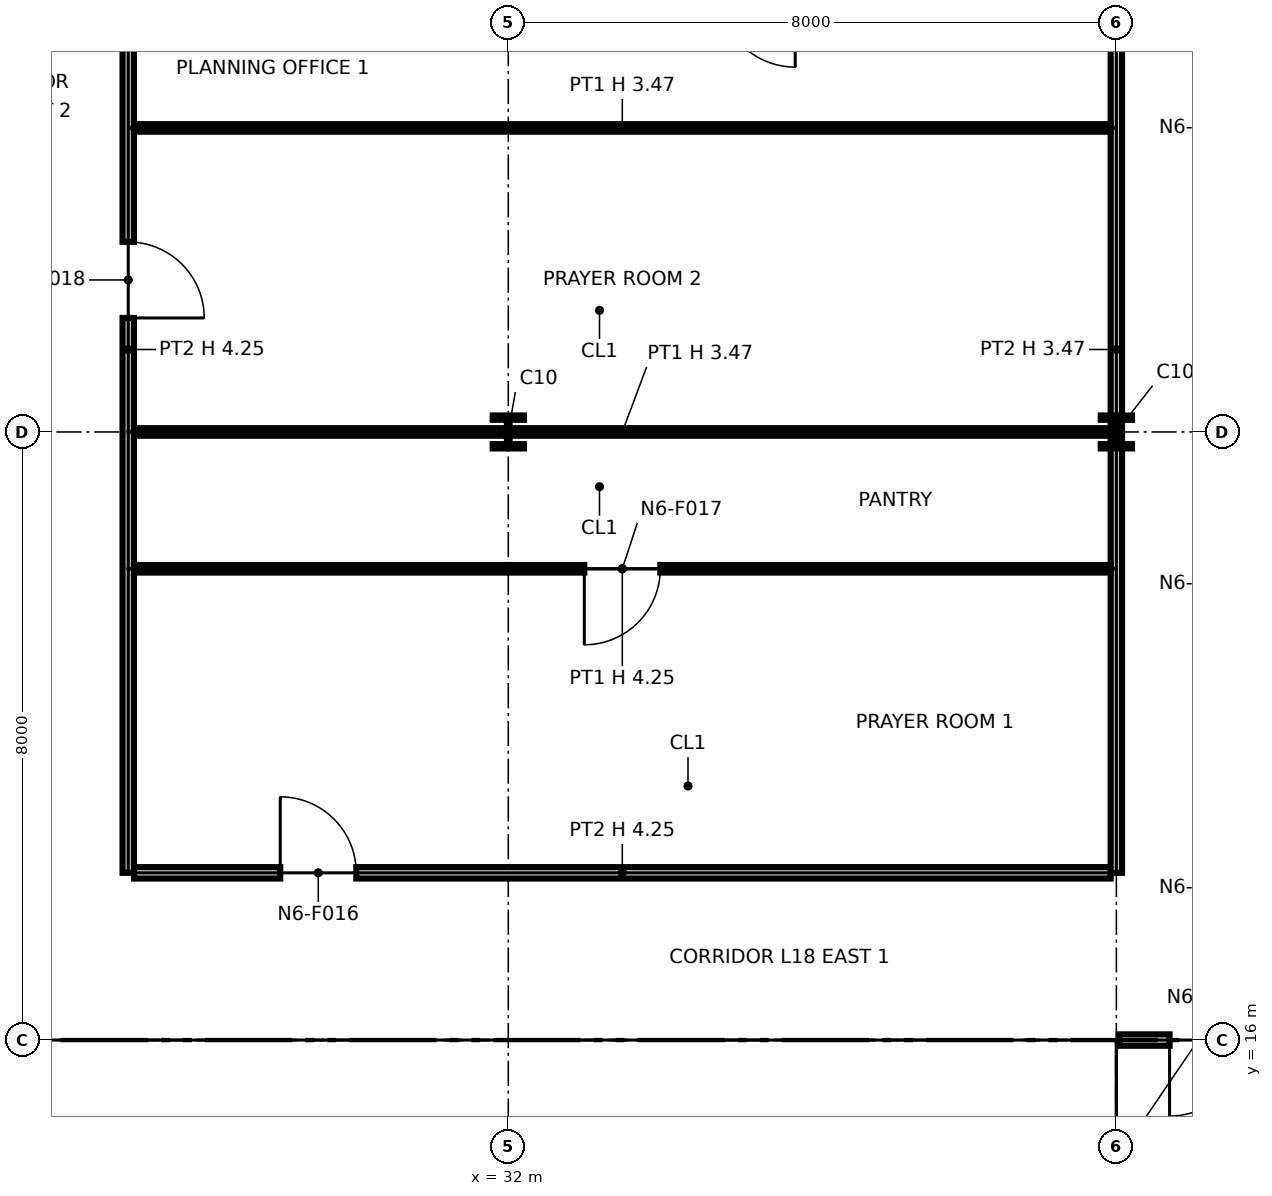
"""IFC4 building model, lengths in metres.
Left out: names, types, materials, properties, quantities, classifications, styles, units other than length and angle.
Written with IfcOpenShell. Run it as: python <this file> out.ifc"""

import sys

from ifc_helpers import new_model, si_unit, direction, frame, frame_2d, origin, origin_2d, place, context, subcontext, project, spatial, polyline, rectangle, i_section, outline, extrude, element, fill, save


model = new_model("IFC4")
c1 = context("Model", 3, precision=1e-05, world=origin(), true_north=direction((0.0, 1.0)))
c2 = subcontext(c1, "Body", "Model", "MODEL_VIEW")
j1 = project(units=[si_unit("LENGTHUNIT", "METRE"), si_unit("PLANEANGLEUNIT", "RADIAN")], contexts=[c1])
p1 = place(None, origin())
s1 = spatial("IfcSite", under=j1, at=p1, CompositionType="ELEMENT")
p2 = place(p1, origin())
s2 = spatial("IfcBuilding", under=s1, at=p2, CompositionType="ELEMENT")
p3 = place(p2, frame((0.0, 0.0, 96.4)))
s3 = spatial("IfcBuildingStorey", under=s2, at=p3, CompositionType="ELEMENT", Elevation=96.4)
p4 = place(p3, frame((32.0, 16.0, 0.0), z_axis=(0.0, 0.0, 1.0), x_axis=(1.0, 0.0, 0.0)))
e1 = element("IfcColumn", 1, at=p4, inside=s3, PredefinedType="COLUMN", context=c2, shape_type="SweptSolid", body=[
    extrude(i_section(OverallWidth=0.406, OverallDepth=0.417, WebThickness=0.03, FlangeThickness=0.048, at=origin_2d()), origin(), (0.0, 0.0, 1.0), 4.25),
])
p5 = place(p3, frame((32.0, 24.0, 0.0), z_axis=(0.0, 0.0, 1.0), x_axis=(1.0, 0.0, 0.0)))
e2 = element("IfcColumn", 2, at=p5, inside=s3, PredefinedType="COLUMN", context=c2, shape_type="SweptSolid", body=[
    extrude(i_section(OverallWidth=0.411, OverallDepth=0.434, WebThickness=0.036, FlangeThickness=0.057, at=origin_2d()), origin(), (0.0, 0.0, 1.0), 4.25),
])
p6 = place(p3, frame((40.0, 16.0, 0.0), z_axis=(0.0, 0.0, 1.0), x_axis=(1.0, 0.0, 0.0)))
e3 = element("IfcColumn", 3, at=p6, inside=s3, PredefinedType="COLUMN", context=c2, shape_type="SweptSolid", body=[
    extrude(i_section(OverallWidth=0.406, OverallDepth=0.417, WebThickness=0.03, FlangeThickness=0.048, at=origin_2d()), origin(), (0.0, 0.0, 1.0), 4.25),
])
p7 = place(p3, frame((40.0, 24.0, 0.0), z_axis=(0.0, 0.0, 1.0), x_axis=(1.0, 0.0, 0.0)))
e4 = element("IfcColumn", 4, at=p7, inside=s3, PredefinedType="COLUMN", context=c2, shape_type="SweptSolid", body=[
    extrude(i_section(OverallWidth=0.411, OverallDepth=0.434, WebThickness=0.036, FlangeThickness=0.057, at=origin_2d()), origin(), (0.0, 0.0, 1.0), 4.25),
])
p8 = place(p3, frame((24.65, 15.25, 0.0), z_axis=(0.0, 0.0, 1.0), x_axis=(1.0, 0.0, 0.0)))
e5 = element("IfcWall", 5, at=p8, inside=s3, PredefinedType="PARTITIONING", context=c2, shape_type="SweptSolid", body=[
    extrude(outline(polyline([(0.0, 0.0), (14.7, 0.0), (14.7, 4.25), (7.469, 4.25), (7.469, 3.632), (7.231, 3.632), (7.23, 4.25), (0.0, 4.25), (0.0, 0.0)])), frame((0.0, 0.1, 0.0), z_axis=(0.0, -1.0, 0.0), x_axis=(1.0, 0.0, 0.0)), (0.0, 0.0, 1.0), 0.2),
])
p9 = place(p8, frame((2.85, 0.0, 0.0)))
e6 = element("IfcOpeningElement", 6, at=p9, cuts=e5, PredefinedType="OPENING", context=c2, shape_type="SweptSolid", body=[
    extrude(rectangle(XDim=1.8, YDim=2.1, at=frame_2d((0.9, 1.05))), frame((0.0, 0.11, 0.0), z_axis=(0.0, -1.0, 0.0), x_axis=(1.0, 0.0, 0.0)), (0.0, 0.0, 1.0), 0.22),
])
p10 = place(p8, frame((9.95, 0.0, 0.0), z_axis=(0.0, 0.0, 1.0), x_axis=(-1.0, 0.0, 0.0)))
e7 = element("IfcOpeningElement", 7, at=p10, cuts=e5, PredefinedType="OPENING", context=c2, shape_type="SweptSolid", body=[
    extrude(rectangle(XDim=1.4, YDim=2.1, at=frame_2d((0.7, 1.05))), frame((0.0, 0.11, 0.0), z_axis=(0.0, -1.0, 0.0), x_axis=(1.0, 0.0, 0.0)), (0.0, 0.0, 1.0), 0.22),
])
p11 = place(p8, frame((13.4, 0.0, 0.0), z_axis=(0.0, 0.0, 1.0), x_axis=(-1.0, 0.0, 0.0)))
e8 = element("IfcOpeningElement", 8, at=p11, cuts=e5, PredefinedType="OPENING", context=c2, shape_type="SweptSolid", body=[
    extrude(rectangle(XDim=1.4, YDim=2.1, at=frame_2d((0.7, 1.05))), frame((0.0, 0.11, 0.0), z_axis=(0.0, -1.0, 0.0), x_axis=(1.0, 0.0, 0.0)), (0.0, 0.0, 1.0), 0.22),
])
p12 = place(p3, frame((32.0, 13.2, 0.0), z_axis=(0.0, 0.0, 1.0), x_axis=(0.0, 1.0, 0.0)))
e9 = element("IfcWall", 9, at=p12, inside=s3, PredefinedType="PARTITIONING", context=c2, shape_type="SweptSolid", body=[
    extrude(rectangle(XDim=1.95, YDim=0.6, at=frame_2d((0.975, 0.0))), origin(), (0.0, 0.0, 1.0), 3.632),
])
for number, where, z_axis, x_axis in (
    (10, (35.6, 8.85, 0.0), (0.0, 0.0, 1.0), (0.0, 1.0, 0.0)),
    (11, (39.25, 8.85, 0.0), (0.0, 0.0, 1.0), (0.0, 1.0, 0.0)),
):
    element("IfcWall", number, at=place(p3, frame(where, z_axis=z_axis, x_axis=x_axis)), inside=s3, PredefinedType="PARTITIONING", context=c2, shape_type="SweptSolid", body=[
        extrude(rectangle(XDim=6.3, YDim=0.2, at=frame_2d((3.15, 0.0))), origin(), (0.0, 0.0, 1.0), 4.25),
    ])
p13 = place(p3, frame((40.03, 16.0, 0.0), z_axis=(0.0, 0.0, 1.0), x_axis=(1.0, 0.0, 0.0)))
e12 = element("IfcWall", 12, at=p13, inside=s3, PredefinedType="PARTITIONING", context=c2, shape_type="SweptSolid", body=[
    extrude(rectangle(XDim=2.095, YDim=0.15, at=frame_2d((1.047, 0.0))), origin(), (0.0, 0.0, 1.0), 3.47),
])
p14 = place(p13, frame((1.67, 0.0, 0.0), z_axis=(0.0, 0.0, 1.0), x_axis=(-1.0, 0.0, 0.0)))
e13 = element("IfcOpeningElement", 13, at=p14, cuts=e12, PredefinedType="OPENING", context=c2, shape_type="SweptSolid", body=[
    extrude(rectangle(XDim=1.0, YDim=2.1, at=frame_2d((0.5, 1.05))), frame((0.0, 0.085, 0.0), z_axis=(0.0, -1.0, 0.0), x_axis=(1.0, 0.0, 0.0)), (0.0, 0.0, 1.0), 0.17),
])
p15 = place(p3, frame((27.075, 18.2, 0.0), z_axis=(0.0, 0.0, 1.0), x_axis=(1.0, 0.0, 0.0)))
e14 = element("IfcWall", 14, at=p15, inside=s3, PredefinedType="PARTITIONING", context=c2, shape_type="SweptSolid", body=[
    extrude(rectangle(XDim=12.85, YDim=0.15, at=frame_2d((6.425, 0.0))), origin(), (0.0, 0.0, 1.0), 4.25),
])
p16 = place(p15, frame((1.925, 0.0, 0.0)))
e15 = element("IfcOpeningElement", 15, at=p16, cuts=e14, PredefinedType="OPENING", context=c2, shape_type="SweptSolid", body=[
    extrude(rectangle(XDim=1.0, YDim=2.1, at=frame_2d((0.5, 1.05))), frame((0.0, 0.085, 0.0), z_axis=(0.0, -1.0, 0.0), x_axis=(1.0, 0.0, 0.0)), (0.0, 0.0, 1.0), 0.17),
])
p17 = place(p3, frame((27.0, 18.2, 0.0), z_axis=(0.0, 0.0, 1.0), x_axis=(0.0, 1.0, 0.0)))
e16 = element("IfcWall", 16, at=p17, inside=s3, PredefinedType="PARTITIONING", context=c2, shape_type="SweptSolid", body=[
    extrude(outline(polyline([(0.0, 0.0), (13.77, 0.0), (13.77, 4.25), (10.1, 4.25), (10.098, 3.47), (9.502, 3.47), (9.5, 4.25), (6.1, 4.25), (6.098, 3.47), (5.502, 3.47), (5.5, 4.25), (2.1, 4.25), (2.098, 3.47), (1.502, 3.47), (1.5, 4.25), (0.0, 4.25), (0.0, 0.0)])), frame((0.0, 0.075, 0.0), z_axis=(0.0, -1.0, 0.0), x_axis=(1.0, 0.0, 0.0)), (0.0, 0.0, 1.0), 0.15),
])
p18 = place(p17, frame((8.3, 0.0, 0.0), z_axis=(0.0, 0.0, 1.0), x_axis=(-1.0, 0.0, 0.0)))
e17 = element("IfcOpeningElement", 17, at=p18, cuts=e16, PredefinedType="OPENING", context=c2, shape_type="SweptSolid", body=[
    extrude(rectangle(XDim=1.0, YDim=2.1, at=frame_2d((0.5, 1.05))), frame((0.0, 0.085, 0.0), z_axis=(0.0, -1.0, 0.0), x_axis=(1.0, 0.0, 0.0)), (0.0, 0.0, 1.0), 0.17),
])
p19 = place(p3, frame((40.0, 18.2, 0.0), z_axis=(0.0, 0.0, 1.0), x_axis=(0.0, 1.0, 0.0)))
e18 = element("IfcWall", 18, at=p19, inside=s3, PredefinedType="PARTITIONING", context=c2, shape_type="SweptSolid", body=[
    extrude(rectangle(XDim=13.77, YDim=0.15, at=frame_2d((6.885, 0.0))), origin(), (0.0, 0.0, 1.0), 3.47),
])
p20 = place(p3, frame((27.075, 22.2, 0.0), z_axis=(0.0, 0.0, 1.0), x_axis=(1.0, 0.0, 0.0)))
e19 = element("IfcWall", 19, at=p20, inside=s3, PredefinedType="PARTITIONING", context=c2, shape_type="SweptSolid", body=[
    extrude(rectangle(XDim=12.85, YDim=0.1, at=frame_2d((6.425, 0.0))), origin(), (0.0, 0.0, 1.0), 4.25),
])
p21 = place(p20, frame((6.925, 0.0, 0.0), z_axis=(0.0, 0.0, 1.0), x_axis=(-1.0, 0.0, 0.0)))
e20 = element("IfcOpeningElement", 20, at=p21, cuts=e19, PredefinedType="OPENING", context=c2, shape_type="SweptSolid", body=[
    extrude(rectangle(XDim=1.0, YDim=2.1, at=frame_2d((0.5, 1.05))), frame((0.0, 0.06, 0.0), z_axis=(0.0, -1.0, 0.0), x_axis=(1.0, 0.0, 0.0)), (0.0, 0.0, 1.0), 0.12),
])
for number, where, z_axis, x_axis in (
    (21, (27.075, 24.0, 0.0), (0.0, 0.0, 1.0), (1.0, 0.0, 0.0)),
    (22, (27.075, 28.0, 0.0), (0.0, 0.0, 1.0), (1.0, 0.0, 0.0)),
):
    element("IfcWall", number, at=place(p3, frame(where, z_axis=z_axis, x_axis=x_axis)), inside=s3, PredefinedType="PARTITIONING", context=c2, shape_type="SweptSolid", body=[
        extrude(rectangle(XDim=12.85, YDim=0.1, at=frame_2d((6.425, 0.0))), origin(), (0.0, 0.0, 1.0), 3.47),
    ])
p22 = place(p9, origin())
e23 = element("IfcDoor", 23, at=p22, inside=s3, OperationType="DOUBLE_DOOR_SINGLE_SWING", PredefinedType="NOTDEFINED", context=c2, shape_type="SweptSolid", body=[
    extrude(rectangle(XDim=1.8, YDim=2.1, at=frame_2d((0.9, 1.05))), frame((0.0, 0.025, 0.0), z_axis=(0.0, -1.0, 0.0), x_axis=(1.0, 0.0, 0.0)), (0.0, 0.0, 1.0), 0.05),
])
fill(e6, e23)
p23 = place(p10, origin())
e24 = element("IfcDoor", 24, at=p23, inside=s3, OperationType="DOUBLE_DOOR_SINGLE_SWING", PredefinedType="NOTDEFINED", context=c2, shape_type="SweptSolid", body=[
    extrude(rectangle(XDim=1.4, YDim=2.1, at=frame_2d((0.7, 1.05))), frame((0.0, 0.025, 0.0), z_axis=(0.0, -1.0, 0.0), x_axis=(1.0, 0.0, 0.0)), (0.0, 0.0, 1.0), 0.05),
])
fill(e7, e24)
p24 = place(p11, origin())
e25 = element("IfcDoor", 25, at=p24, inside=s3, OperationType="DOUBLE_DOOR_SINGLE_SWING", PredefinedType="NOTDEFINED", context=c2, shape_type="SweptSolid", body=[
    extrude(rectangle(XDim=1.4, YDim=2.1, at=frame_2d((0.7, 1.05))), frame((0.0, 0.025, 0.0), z_axis=(0.0, -1.0, 0.0), x_axis=(1.0, 0.0, 0.0)), (0.0, 0.0, 1.0), 0.05),
])
fill(e8, e25)
p25 = place(p14, origin())
e26 = element("IfcDoor", 26, at=p25, inside=s3, OperationType="SINGLE_SWING_RIGHT", PredefinedType="DOOR", context=c2, shape_type="SweptSolid", body=[
    extrude(rectangle(XDim=1.0, YDim=2.1, at=frame_2d((0.5, 1.05))), frame((0.0, 0.025, 0.0), z_axis=(0.0, -1.0, 0.0), x_axis=(1.0, 0.0, 0.0)), (0.0, 0.0, 1.0), 0.05),
])
fill(e13, e26)
p26 = place(p16, origin())
e27 = element("IfcDoor", 27, at=p26, inside=s3, OperationType="SINGLE_SWING_LEFT", PredefinedType="DOOR", context=c2, shape_type="SweptSolid", body=[
    extrude(rectangle(XDim=1.0, YDim=2.1, at=frame_2d((0.5, 1.05))), frame((0.0, 0.025, 0.0), z_axis=(0.0, -1.0, 0.0), x_axis=(1.0, 0.0, 0.0)), (0.0, 0.0, 1.0), 0.05),
])
fill(e15, e27)
p27 = place(p21, origin())
e28 = element("IfcDoor", 28, at=p27, inside=s3, OperationType="SINGLE_SWING_RIGHT", PredefinedType="DOOR", context=c2, shape_type="SweptSolid", body=[
    extrude(rectangle(XDim=1.0, YDim=2.1, at=frame_2d((0.5, 1.05))), frame((0.0, 0.025, 0.0), z_axis=(0.0, -1.0, 0.0), x_axis=(1.0, 0.0, 0.0)), (0.0, 0.0, 1.0), 0.05),
])
fill(e20, e28)
p28 = place(p18, origin())
e29 = element("IfcDoor", 29, at=p28, inside=s3, OperationType="SINGLE_SWING_RIGHT", PredefinedType="DOOR", context=c2, shape_type="SweptSolid", body=[
    extrude(rectangle(XDim=1.0, YDim=2.1, at=frame_2d((0.5, 1.05))), frame((0.0, 0.025, 0.0), z_axis=(0.0, -1.0, 0.0), x_axis=(1.0, 0.0, 0.0)), (0.0, 0.0, 1.0), 0.05),
])
fill(e17, e29)
save(model, sys.argv[1])
